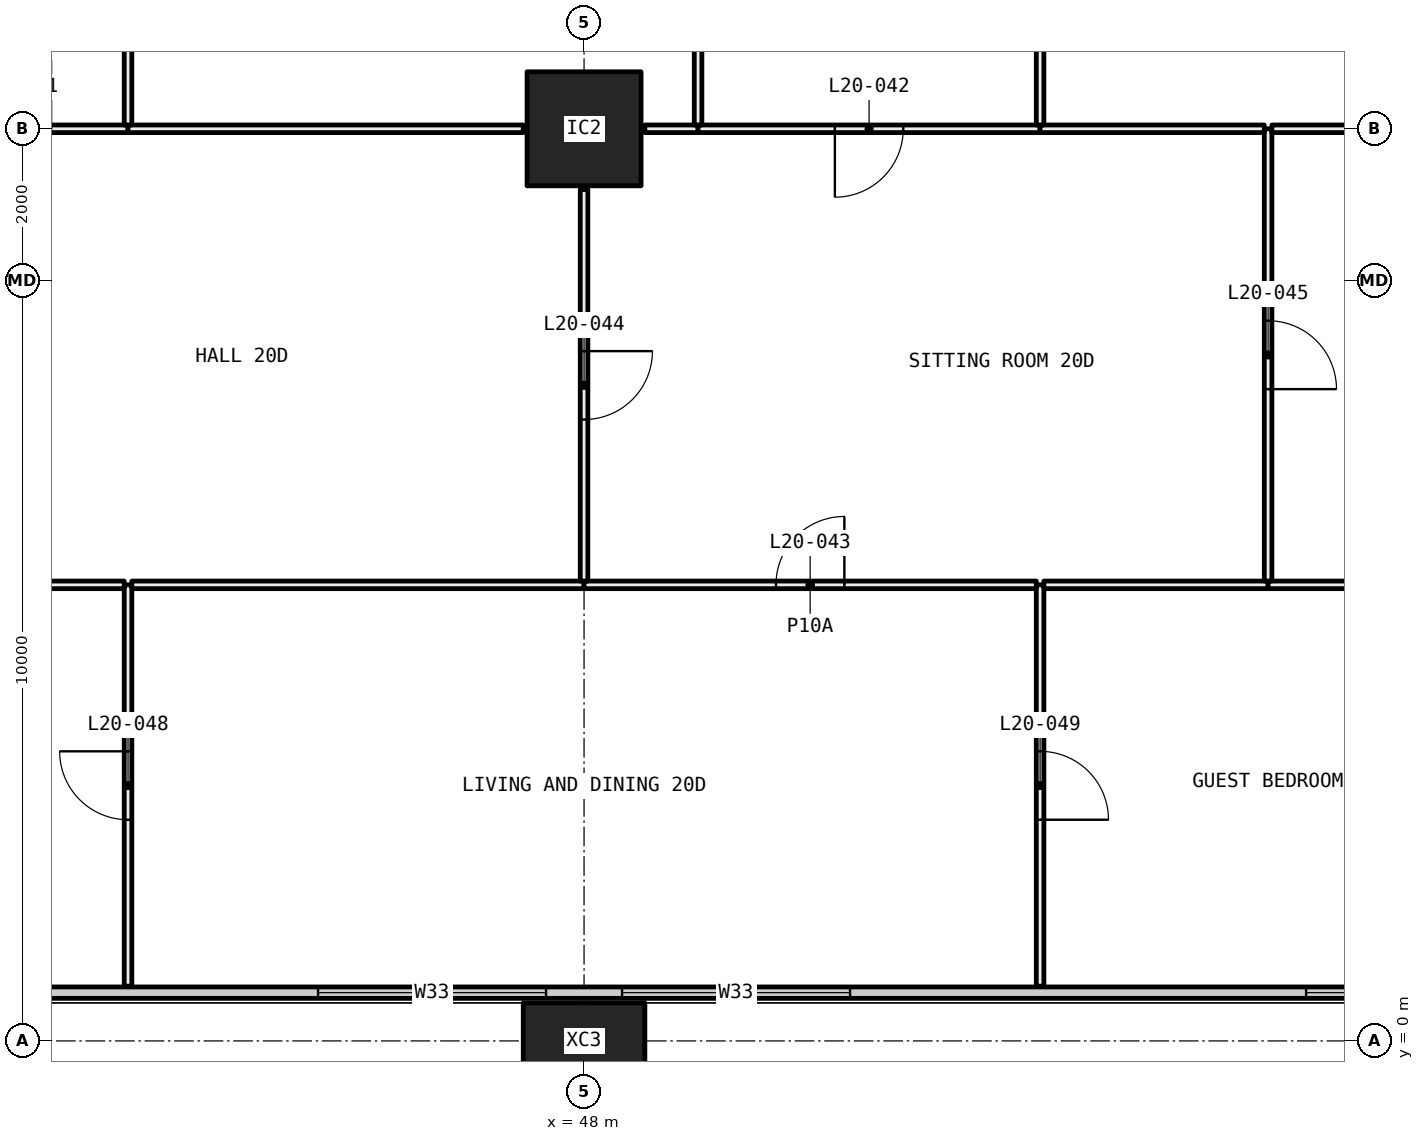
"""IFC4 building model, lengths in metres.
Left out: names, types, materials, properties, quantities, classifications, styles, units other than length and angle.
Written with IfcOpenShell. Run it as: python <this file> out.ifc"""

import sys

from ifc_helpers import new_model, si_unit, direction, frame, frame_2d, origin, origin_2d, place, context, subcontext, project, spatial, rectangle, hollow_rectangle, extrude, element, fill, save


model = new_model("IFC4")
c1 = context("Model", 3, precision=1e-05, world=origin(), true_north=direction((0.0, 1.0)))
c2 = subcontext(c1, "Body", "Model", "MODEL_VIEW")
j1 = project(units=[si_unit("LENGTHUNIT", "METRE"), si_unit("PLANEANGLEUNIT", "RADIAN")], contexts=[c1])
p1 = place(None, origin())
s1 = spatial("IfcSite", under=j1, at=p1, CompositionType="ELEMENT")
p2 = place(p1, origin())
s2 = spatial("IfcBuilding", under=s1, at=p2, CompositionType="ELEMENT")
p3 = place(p2, frame((0.0, 0.0, 81.75)))
s3 = spatial("IfcBuildingStorey", under=s2, at=p3, CompositionType="ELEMENT", Elevation=81.75)
p4 = place(p3, frame((48.0, 0.0, -0.4), z_axis=(0.0, 0.0, 1.0), x_axis=(1.0, 0.0, 0.0)))
e1 = element("IfcColumn", 1, at=p4, inside=s3, PredefinedType="COLUMN", context=c2, shape_type="SweptSolid", body=[
    extrude(hollow_rectangle(XDim=1.6, YDim=1.0, WallThickness=0.065, at=origin_2d()), origin(), (0.0, 0.0, 1.0), 3.45),
])
p5 = place(p3, frame((48.0, 12.0, 0.0), z_axis=(0.0, 0.0, 1.0), x_axis=(1.0, 0.0, 0.0)))
e2 = element("IfcColumn", 2, at=p5, inside=s3, PredefinedType="COLUMN", context=c2, shape_type="SweptSolid", body=[
    extrude(hollow_rectangle(XDim=1.5, YDim=1.5, WallThickness=0.065, at=origin_2d()), origin(), (0.0, 0.0, 1.0), 3.05),
])
p6 = place(p3, frame((6.56, 0.635, 0.0), z_axis=(0.0, 0.0, 1.0), x_axis=(1.0, 0.0, 0.0)))
e3 = element("IfcWall", 3, at=p6, inside=s3, PredefinedType="ELEMENTEDWALL", context=c2, shape_type="SweptSolid", body=[
    extrude(rectangle(XDim=58.88, YDim=0.15, at=frame_2d((29.44, 0.0))), origin(), (0.0, 0.0, 1.0), 3.05),
])
p7 = place(p6, frame((0.44, 0.0, 0.45)))
e4 = element("IfcOpeningElement", 4, at=p7, cuts=e3, PredefinedType="OPENING", context=c2, shape_type="SweptSolid", body=[
    extrude(rectangle(XDim=4.5, YDim=2.55, at=frame_2d((2.25, 1.275))), frame((0.0, 0.085, 0.0), z_axis=(0.0, -1.0, 0.0), x_axis=(1.0, 0.0, 0.0)), (0.0, 0.0, 1.0), 0.17),
])
p8 = place(p6, frame((5.94, 0.0, 0.45)))
e5 = element("IfcOpeningElement", 5, at=p8, cuts=e3, PredefinedType="OPENING", context=c2, shape_type="SweptSolid", body=[
    extrude(rectangle(XDim=3.0, YDim=2.55, at=frame_2d((1.5, 1.275))), frame((0.0, 0.085, 0.0), z_axis=(0.0, -1.0, 0.0), x_axis=(1.0, 0.0, 0.0)), (0.0, 0.0, 1.0), 0.17),
])
p9 = place(p6, frame((13.94, 0.0, 0.45)))
e6 = element("IfcOpeningElement", 6, at=p9, cuts=e3, PredefinedType="OPENING", context=c2, shape_type="SweptSolid", body=[
    extrude(rectangle(XDim=3.0, YDim=2.55, at=frame_2d((1.5, 1.275))), frame((0.0, 0.085, 0.0), z_axis=(0.0, -1.0, 0.0), x_axis=(1.0, 0.0, 0.0)), (0.0, 0.0, 1.0), 0.17),
])
p10 = place(p6, frame((17.94, 0.0, 0.45)))
e7 = element("IfcOpeningElement", 7, at=p10, cuts=e3, PredefinedType="OPENING", context=c2, shape_type="SweptSolid", body=[
    extrude(rectangle(XDim=3.0, YDim=2.55, at=frame_2d((1.5, 1.275))), frame((0.0, 0.085, 0.0), z_axis=(0.0, -1.0, 0.0), x_axis=(1.0, 0.0, 0.0)), (0.0, 0.0, 1.0), 0.17),
])
p11 = place(p6, frame((26.94, 0.0, 0.45)))
e8 = element("IfcOpeningElement", 8, at=p11, cuts=e3, PredefinedType="OPENING", context=c2, shape_type="SweptSolid", body=[
    extrude(rectangle(XDim=2.0, YDim=2.55, at=frame_2d((1.0, 1.275))), frame((0.0, 0.085, 0.0), z_axis=(0.0, -1.0, 0.0), x_axis=(1.0, 0.0, 0.0)), (0.0, 0.0, 1.0), 0.17),
])
p12 = place(p6, frame((29.94, 0.0, 0.45)))
e9 = element("IfcOpeningElement", 9, at=p12, cuts=e3, PredefinedType="OPENING", context=c2, shape_type="SweptSolid", body=[
    extrude(rectangle(XDim=3.0, YDim=2.55, at=frame_2d((1.5, 1.275))), frame((0.0, 0.085, 0.0), z_axis=(0.0, -1.0, 0.0), x_axis=(1.0, 0.0, 0.0)), (0.0, 0.0, 1.0), 0.17),
])
p13 = place(p6, frame((37.94, 0.0, 0.45)))
e10 = element("IfcOpeningElement", 10, at=p13, cuts=e3, PredefinedType="OPENING", context=c2, shape_type="SweptSolid", body=[
    extrude(rectangle(XDim=3.0, YDim=2.55, at=frame_2d((1.5, 1.275))), frame((0.0, 0.085, 0.0), z_axis=(0.0, -1.0, 0.0), x_axis=(1.0, 0.0, 0.0)), (0.0, 0.0, 1.0), 0.17),
])
p14 = place(p6, frame((41.94, 0.0, 0.45)))
e11 = element("IfcOpeningElement", 11, at=p14, cuts=e3, PredefinedType="OPENING", context=c2, shape_type="SweptSolid", body=[
    extrude(rectangle(XDim=3.0, YDim=2.55, at=frame_2d((1.5, 1.275))), frame((0.0, 0.085, 0.0), z_axis=(0.0, -1.0, 0.0), x_axis=(1.0, 0.0, 0.0)), (0.0, 0.0, 1.0), 0.17),
])
p15 = place(p6, frame((50.94, 0.0, 0.45)))
e12 = element("IfcOpeningElement", 12, at=p15, cuts=e3, PredefinedType="OPENING", context=c2, shape_type="SweptSolid", body=[
    extrude(rectangle(XDim=2.0, YDim=2.55, at=frame_2d((1.0, 1.275))), frame((0.0, 0.085, 0.0), z_axis=(0.0, -1.0, 0.0), x_axis=(1.0, 0.0, 0.0)), (0.0, 0.0, 1.0), 0.17),
])
p16 = place(p6, frame((53.94, 0.0, 0.45)))
e13 = element("IfcOpeningElement", 13, at=p16, cuts=e3, PredefinedType="OPENING", context=c2, shape_type="SweptSolid", body=[
    extrude(rectangle(XDim=4.5, YDim=2.55, at=frame_2d((2.25, 1.275))), frame((0.0, 0.085, 0.0), z_axis=(0.0, -1.0, 0.0), x_axis=(1.0, 0.0, 0.0)), (0.0, 0.0, 1.0), 0.17),
])
p17 = place(p3, frame((42.0, 0.72, 0.0), z_axis=(0.0, 0.0, 1.0), x_axis=(0.0, 1.0, 0.0)))
e14 = element("IfcWall", 14, at=p17, inside=s3, PredefinedType="PARTITIONING", context=c2, shape_type="SweptSolid", body=[
    extrude(rectangle(XDim=5.28, YDim=0.1, at=frame_2d((2.64, 0.0))), origin(), (0.0, 0.0, 1.0), 3.05),
])
p18 = place(p17, frame((2.19, 0.0, 0.0)))
e15 = element("IfcOpeningElement", 15, at=p18, cuts=e14, PredefinedType="OPENING", context=c2, shape_type="SweptSolid", body=[
    extrude(rectangle(XDim=0.9, YDim=2.1, at=frame_2d((0.45, 1.05))), frame((0.0, 0.06, 0.0), z_axis=(0.0, -1.0, 0.0), x_axis=(1.0, 0.0, 0.0)), (0.0, 0.0, 1.0), 0.12),
])
p19 = place(p3, frame((41.95, 6.0, 0.0), z_axis=(0.0, 0.0, 1.0), x_axis=(-1.0, 0.0, 0.0)))
e16 = element("IfcWall", 16, at=p19, inside=s3, PredefinedType="PARTITIONING", context=c2, shape_type="SweptSolid", body=[
    extrude(rectangle(XDim=2.875, YDim=0.1, at=frame_2d((1.438, 0.0))), origin(), (0.0, 0.0, 1.0), 3.05),
])
p20 = place(p3, frame((54.0, 0.72, 0.0), z_axis=(0.0, 0.0, 1.0), x_axis=(0.0, 1.0, 0.0)))
e17 = element("IfcWall", 17, at=p20, inside=s3, PredefinedType="PARTITIONING", context=c2, shape_type="SweptSolid", body=[
    extrude(rectangle(XDim=5.28, YDim=0.1, at=frame_2d((2.64, 0.0))), origin(), (0.0, 0.0, 1.0), 3.05),
])
p21 = place(p20, frame((2.19, 0.0, 0.0)))
e18 = element("IfcOpeningElement", 18, at=p21, cuts=e17, PredefinedType="OPENING", context=c2, shape_type="SweptSolid", body=[
    extrude(rectangle(XDim=0.9, YDim=2.1, at=frame_2d((0.45, 1.05))), frame((0.0, 0.06, 0.0), z_axis=(0.0, -1.0, 0.0), x_axis=(1.0, 0.0, 0.0)), (0.0, 0.0, 1.0), 0.12),
])
p22 = place(p3, frame((48.0, 6.0, 0.0), z_axis=(0.0, 0.0, 1.0), x_axis=(-1.0, 0.0, 0.0)))
e19 = element("IfcWall", 19, at=p22, inside=s3, PredefinedType="PARTITIONING", context=c2, shape_type="SweptSolid", body=[
    extrude(rectangle(XDim=5.95, YDim=0.1, at=frame_2d((2.975, 0.0))), origin(), (0.0, 0.0, 1.0), 2.45),
])
p23 = place(p3, frame((53.95, 6.0, 0.0), z_axis=(0.0, 0.0, 1.0), x_axis=(-1.0, 0.0, 0.0)))
e20 = element("IfcWall", 20, at=p23, inside=s3, PredefinedType="PARTITIONING", context=c2, shape_type="SweptSolid", body=[
    extrude(rectangle(XDim=5.95, YDim=0.1, at=frame_2d((2.975, 0.0))), origin(), (0.0, 0.0, 1.0), 2.45),
])
p24 = place(p23, frame((2.525, 0.0, 0.0)))
e21 = element("IfcOpeningElement", 21, at=p24, cuts=e20, PredefinedType="OPENING", context=c2, shape_type="SweptSolid", body=[
    extrude(rectangle(XDim=0.9, YDim=2.1, at=frame_2d((0.45, 1.05))), frame((0.0, 0.06, 0.0), z_axis=(0.0, -1.0, 0.0), x_axis=(1.0, 0.0, 0.0)), (0.0, 0.0, 1.0), 0.12),
])
p25 = place(p3, frame((57.0, 6.0, 0.0), z_axis=(0.0, 0.0, 1.0), x_axis=(-1.0, 0.0, 0.0)))
e22 = element("IfcWall", 22, at=p25, inside=s3, PredefinedType="PARTITIONING", context=c2, shape_type="SweptSolid", body=[
    extrude(rectangle(XDim=2.95, YDim=0.1, at=frame_2d((1.475, 0.0))), origin(), (0.0, 0.0, 1.0), 3.05),
])
p26 = place(p3, frame((59.95, 6.0, 0.0), z_axis=(0.0, 0.0, 1.0), x_axis=(-1.0, 0.0, 0.0)))
e23 = element("IfcWall", 23, at=p26, inside=s3, PredefinedType="PARTITIONING", context=c2, shape_type="SweptSolid", body=[
    extrude(rectangle(XDim=2.95, YDim=0.1, at=frame_2d((1.475, 0.0))), origin(), (0.0, 0.0, 1.0), 2.45),
])
p27 = place(p3, frame((48.0, 6.05, 0.0), z_axis=(0.0, 0.0, 1.0), x_axis=(0.0, 1.0, 0.0)))
e24 = element("IfcWall", 24, at=p27, inside=s3, PredefinedType="PARTITIONING", context=c2, shape_type="SweptSolid", body=[
    extrude(rectangle(XDim=5.15, YDim=0.1, at=frame_2d((2.575, 0.0))), origin(), (0.0, 0.0, 1.0), 2.45),
])
p28 = place(p27, frame((2.125, 0.0, 0.0)))
e25 = element("IfcOpeningElement", 25, at=p28, cuts=e24, PredefinedType="OPENING", context=c2, shape_type="SweptSolid", body=[
    extrude(rectangle(XDim=0.9, YDim=2.1, at=frame_2d((0.45, 1.05))), frame((0.0, 0.06, 0.0), z_axis=(0.0, -1.0, 0.0), x_axis=(1.0, 0.0, 0.0)), (0.0, 0.0, 1.0), 0.12),
])
p29 = place(p3, frame((42.0, 12.0, 0.0), z_axis=(0.0, 0.0, 1.0), x_axis=(-1.0, 0.0, 0.0)))
e26 = element("IfcWall", 26, at=p29, inside=s3, PredefinedType="PARTITIONING", context=c2, shape_type="SweptSolid", body=[
    extrude(rectangle(XDim=2.925, YDim=0.1, at=frame_2d((1.462, 0.0))), origin(), (0.0, 0.0, 1.0), 2.45),
])
p30 = place(p29, frame((1.012, 0.0, 0.0)))
e27 = element("IfcOpeningElement", 27, at=p30, cuts=e26, PredefinedType="OPENING", context=c2, shape_type="SweptSolid", body=[
    extrude(rectangle(XDim=0.9, YDim=2.1, at=frame_2d((0.45, 1.05))), frame((0.0, 0.06, 0.0), z_axis=(0.0, -1.0, 0.0), x_axis=(1.0, 0.0, 0.0)), (0.0, 0.0, 1.0), 0.12),
])
p31 = place(p3, frame((47.2, 12.0, 0.0), z_axis=(0.0, 0.0, 1.0), x_axis=(-1.0, 0.0, 0.0)))
e28 = element("IfcWall", 28, at=p31, inside=s3, PredefinedType="PARTITIONING", context=c2, shape_type="SweptSolid", body=[
    extrude(rectangle(XDim=5.2, YDim=0.1, at=frame_2d((2.6, 0.0))), origin(), (0.0, 0.0, 1.0), 2.45),
])
p32 = place(p3, frame((57.0, 6.05, 0.0), z_axis=(0.0, 0.0, 1.0), x_axis=(0.0, 1.0, 0.0)))
e29 = element("IfcWall", 29, at=p32, inside=s3, PredefinedType="PARTITIONING", context=c2, shape_type="SweptSolid", body=[
    extrude(rectangle(XDim=5.95, YDim=0.1, at=frame_2d((2.975, 0.0))), origin(), (0.0, 0.0, 1.0), 2.45),
])
p33 = place(p32, frame((2.525, 0.0, 0.0)))
e30 = element("IfcOpeningElement", 30, at=p33, cuts=e29, PredefinedType="OPENING", context=c2, shape_type="SweptSolid", body=[
    extrude(rectangle(XDim=0.9, YDim=2.1, at=frame_2d((0.45, 1.05))), frame((0.0, 0.06, 0.0), z_axis=(0.0, -1.0, 0.0), x_axis=(1.0, 0.0, 0.0)), (0.0, 0.0, 1.0), 0.12),
])
p34 = place(p3, frame((49.5, 12.0, 0.0), z_axis=(0.0, 0.0, 1.0), x_axis=(-1.0, 0.0, 0.0)))
e31 = element("IfcWall", 31, at=p34, inside=s3, PredefinedType="PARTITIONING", context=c2, shape_type="SweptSolid", body=[
    extrude(rectangle(XDim=0.7, YDim=0.1, at=frame_2d((0.35, 0.0))), origin(), (0.0, 0.0, 1.0), 2.45),
])
p35 = place(p3, frame((54.0, 12.0, 0.0), z_axis=(0.0, 0.0, 1.0), x_axis=(-1.0, 0.0, 0.0)))
e32 = element("IfcWall", 32, at=p35, inside=s3, PredefinedType="PARTITIONING", context=c2, shape_type="SweptSolid", body=[
    extrude(rectangle(XDim=4.5, YDim=0.1, at=frame_2d((2.25, 0.0))), origin(), (0.0, 0.0, 1.0), 2.45),
])
p36 = place(p35, frame((1.8, 0.0, 0.0)))
e33 = element("IfcOpeningElement", 33, at=p36, cuts=e32, PredefinedType="OPENING", context=c2, shape_type="SweptSolid", body=[
    extrude(rectangle(XDim=0.9, YDim=2.1, at=frame_2d((0.45, 1.05))), frame((0.0, 0.06, 0.0), z_axis=(0.0, -1.0, 0.0), x_axis=(1.0, 0.0, 0.0)), (0.0, 0.0, 1.0), 0.12),
])
p37 = place(p3, frame((56.95, 12.0, 0.0), z_axis=(0.0, 0.0, 1.0), x_axis=(-1.0, 0.0, 0.0)))
e34 = element("IfcWall", 34, at=p37, inside=s3, PredefinedType="PARTITIONING", context=c2, shape_type="SweptSolid", body=[
    extrude(rectangle(XDim=2.95, YDim=0.1, at=frame_2d((1.475, 0.0))), origin(), (0.0, 0.0, 1.0), 2.45),
])
p38 = place(p3, frame((59.2, 12.0, 0.0), z_axis=(0.0, 0.0, 1.0), x_axis=(-1.0, 0.0, 0.0)))
e35 = element("IfcWall", 35, at=p38, inside=s3, PredefinedType="PARTITIONING", context=c2, shape_type="SweptSolid", body=[
    extrude(rectangle(XDim=2.15, YDim=0.1, at=frame_2d((1.075, 0.0))), origin(), (0.0, 0.0, 1.0), 2.45),
])
p39 = place(p3, frame((42.0, 12.05, 0.0), z_axis=(0.0, 0.0, 1.0), x_axis=(0.0, 1.0, 0.0)))
e36 = element("IfcWall", 36, at=p39, inside=s3, PredefinedType="PARTITIONING", context=c2, shape_type="SweptSolid", body=[
    extrude(rectangle(XDim=5.95, YDim=0.1, at=frame_2d((2.975, 0.0))), origin(), (0.0, 0.0, 1.0), 2.45),
])
p40 = place(p3, frame((49.5, 12.05, 0.0), z_axis=(0.0, 0.0, 1.0), x_axis=(0.0, 1.0, 0.0)))
e37 = element("IfcWall", 37, at=p40, inside=s3, PredefinedType="PARTITIONING", context=c2, shape_type="SweptSolid", body=[
    extrude(rectangle(XDim=5.85, YDim=0.1, at=frame_2d((2.925, 0.0))), origin(), (0.0, 0.0, 1.0), 2.45),
])
p41 = place(p40, frame((2.475, 0.0, 0.0)))
e38 = element("IfcOpeningElement", 38, at=p41, cuts=e37, PredefinedType="OPENING", context=c2, shape_type="SweptSolid", body=[
    extrude(rectangle(XDim=0.9, YDim=2.1, at=frame_2d((0.45, 1.05))), frame((0.0, 0.06, 0.0), z_axis=(0.0, -1.0, 0.0), x_axis=(1.0, 0.0, 0.0)), (0.0, 0.0, 1.0), 0.12),
])
p42 = place(p3, frame((54.0, 12.05, 0.0), z_axis=(0.0, 0.0, 1.0), x_axis=(0.0, 1.0, 0.0)))
e39 = element("IfcWall", 39, at=p42, inside=s3, PredefinedType="PARTITIONING", context=c2, shape_type="SweptSolid", body=[
    extrude(rectangle(XDim=5.85, YDim=0.1, at=frame_2d((2.925, 0.0))), origin(), (0.0, 0.0, 1.0), 2.45),
])
p43 = place(p42, frame((2.475, 0.0, 0.0)))
e40 = element("IfcOpeningElement", 40, at=p43, cuts=e39, PredefinedType="OPENING", context=c2, shape_type="SweptSolid", body=[
    extrude(rectangle(XDim=0.9, YDim=2.1, at=frame_2d((0.45, 1.05))), frame((0.0, 0.06, 0.0), z_axis=(0.0, -1.0, 0.0), x_axis=(1.0, 0.0, 0.0)), (0.0, 0.0, 1.0), 0.12),
])
p44 = place(p13, origin())
e41 = element("IfcWindow", 41, at=p44, inside=s3, PartitioningType="SINGLE_PANEL", PredefinedType="WINDOW", context=c2, shape_type="SweptSolid", body=[
    extrude(rectangle(XDim=3.0, YDim=2.55, at=frame_2d((1.5, 1.275))), frame((0.0, 0.03, 0.0), z_axis=(0.0, -1.0, 0.0), x_axis=(1.0, 0.0, 0.0)), (0.0, 0.0, 1.0), 0.06),
])
fill(e10, e41)
p45 = place(p14, origin())
e42 = element("IfcWindow", 42, at=p45, inside=s3, PartitioningType="SINGLE_PANEL", PredefinedType="WINDOW", context=c2, shape_type="SweptSolid", body=[
    extrude(rectangle(XDim=3.0, YDim=2.55, at=frame_2d((1.5, 1.275))), frame((0.0, 0.03, 0.0), z_axis=(0.0, -1.0, 0.0), x_axis=(1.0, 0.0, 0.0)), (0.0, 0.0, 1.0), 0.06),
])
fill(e11, e42)
p46 = place(p15, origin())
e43 = element("IfcWindow", 43, at=p46, inside=s3, PartitioningType="SINGLE_PANEL", PredefinedType="WINDOW", context=c2, shape_type="SweptSolid", body=[
    extrude(rectangle(XDim=2.0, YDim=2.55, at=frame_2d((1.0, 1.275))), frame((0.0, 0.03, 0.0), z_axis=(0.0, -1.0, 0.0), x_axis=(1.0, 0.0, 0.0)), (0.0, 0.0, 1.0), 0.06),
])
fill(e12, e43)
p47 = place(p36, origin())
e44 = element("IfcDoor", 44, at=p47, inside=s3, OperationType="SINGLE_SWING_LEFT", PredefinedType="DOOR", context=c2, shape_type="SweptSolid", body=[
    extrude(rectangle(XDim=0.9, YDim=2.1, at=frame_2d((0.45, 1.05))), frame((0.0, 0.025, 0.0), z_axis=(0.0, -1.0, 0.0), x_axis=(1.0, 0.0, 0.0)), (0.0, 0.0, 1.0), 0.05),
])
fill(e33, e44)
p48 = place(p24, frame((0.9, 0.0, 0.0), x_axis=(-1.0, 0.0, 0.0)))
e45 = element("IfcDoor", 45, at=p48, inside=s3, OperationType="SINGLE_SWING_LEFT", PredefinedType="DOOR", context=c2, shape_type="SweptSolid", body=[
    extrude(rectangle(XDim=0.9, YDim=2.1, at=frame_2d((0.45, 1.05))), frame((0.0, 0.025, 0.0), z_axis=(0.0, -1.0, 0.0), x_axis=(1.0, 0.0, 0.0)), (0.0, 0.0, 1.0), 0.05),
])
fill(e21, e45)
p49 = place(p28, frame((0.9, 0.0, 0.0), x_axis=(-1.0, 0.0, 0.0)))
e46 = element("IfcDoor", 46, at=p49, inside=s3, OperationType="SINGLE_SWING_RIGHT", PredefinedType="DOOR", context=c2, shape_type="SweptSolid", body=[
    extrude(rectangle(XDim=0.9, YDim=2.1, at=frame_2d((0.45, 1.05))), frame((0.0, 0.025, 0.0), z_axis=(0.0, -1.0, 0.0), x_axis=(1.0, 0.0, 0.0)), (0.0, 0.0, 1.0), 0.05),
])
fill(e25, e46)
p50 = place(p33, frame((0.9, 0.0, 0.0), x_axis=(-1.0, 0.0, 0.0)))
e47 = element("IfcDoor", 47, at=p50, inside=s3, OperationType="SINGLE_SWING_LEFT", PredefinedType="DOOR", context=c2, shape_type="SweptSolid", body=[
    extrude(rectangle(XDim=0.9, YDim=2.1, at=frame_2d((0.45, 1.05))), frame((0.0, 0.025, 0.0), z_axis=(0.0, -1.0, 0.0), x_axis=(1.0, 0.0, 0.0)), (0.0, 0.0, 1.0), 0.05),
])
fill(e30, e47)
p51 = place(p18, origin())
e48 = element("IfcDoor", 48, at=p51, inside=s3, OperationType="SINGLE_SWING_LEFT", PredefinedType="DOOR", context=c2, shape_type="SweptSolid", body=[
    extrude(rectangle(XDim=0.9, YDim=2.1, at=frame_2d((0.45, 1.05))), frame((0.0, 0.025, 0.0), z_axis=(0.0, -1.0, 0.0), x_axis=(1.0, 0.0, 0.0)), (0.0, 0.0, 1.0), 0.05),
])
fill(e15, e48)
p52 = place(p21, frame((0.9, 0.0, 0.0), x_axis=(-1.0, 0.0, 0.0)))
e49 = element("IfcDoor", 49, at=p52, inside=s3, OperationType="SINGLE_SWING_LEFT", PredefinedType="DOOR", context=c2, shape_type="SweptSolid", body=[
    extrude(rectangle(XDim=0.9, YDim=2.1, at=frame_2d((0.45, 1.05))), frame((0.0, 0.025, 0.0), z_axis=(0.0, -1.0, 0.0), x_axis=(1.0, 0.0, 0.0)), (0.0, 0.0, 1.0), 0.05),
])
fill(e18, e49)
save(model, sys.argv[1])
